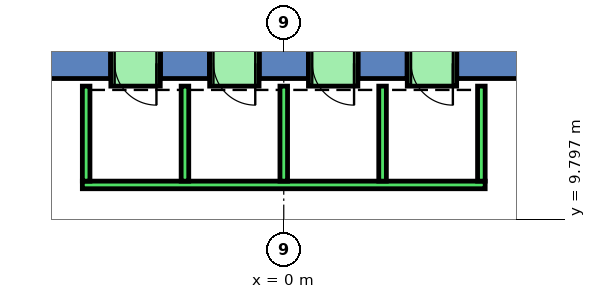
"""IFC4 building model, lengths in metres.
Left out: names, types, materials, properties, quantities, classifications, styles, units other than length and angle.
Written with IfcOpenShell. Run it as: python <this file> out.ifc"""

import sys

from ifc_helpers import new_model, si_unit, direction, frame, frame_2d, origin, place, context, subcontext, project, spatial, polyline, rectangle, outline, extrude, element, fill, save


model = new_model("IFC4")
c1 = context("Model", 3, precision=1e-05, world=origin(), true_north=direction((0.0, 1.0)))
c2 = subcontext(c1, "Body", "Model", "MODEL_VIEW")
j1 = project(units=[si_unit("LENGTHUNIT", "METRE"), si_unit("PLANEANGLEUNIT", "RADIAN")], contexts=[c1])
p1 = place(None, origin())
s1 = spatial("IfcSite", under=j1, at=p1, CompositionType="ELEMENT")
p2 = place(p1, origin())
s2 = spatial("IfcBuilding", under=s1, at=p2, CompositionType="ELEMENT")
p3 = place(p2, frame((0.0, 0.0, 30.0)))
s3 = spatial("IfcBuildingStorey", under=s2, at=p3, CompositionType="ELEMENT", Elevation=30.0)
p4 = place(p3, frame((0.0, 0.0, -0.45)))
e1 = element("IfcWall", 1, at=p4, inside=s3, PredefinedType="SHEAR", context=c2, shape_type="SweptSolid", body=[
    extrude(outline(polyline([(4.55, 14.5), (4.55, 13.5), (6.351, 13.5), (6.928, 14.5), (4.55, 14.5)])), origin(), (0.0, 0.0, 1.0), 4.85),
])
p5 = place(p3, frame((0.0, 0.0, -0.45)))
e2 = element("IfcWall", 2, at=p5, inside=s3, PredefinedType="SHEAR", context=c2, shape_type="SweptSolid", body=[
    extrude(outline(polyline([(1.95, 14.5), (1.95, 13.5), (3.25, 13.5), (3.25, 14.5), (1.95, 14.5)])), origin(), (0.0, 0.0, 1.0), 4.85),
])
p6 = place(p3, frame((0.0, 0.0, -0.45)))
e3 = element("IfcWall", 3, at=p6, inside=s3, PredefinedType="SHEAR", context=c2, shape_type="SweptSolid", body=[
    extrude(outline(polyline([(-0.65, 14.5), (-0.65, 13.5), (0.65, 13.5), (0.65, 14.5), (-0.65, 14.5)])), origin(), (0.0, 0.0, 1.0), 4.85),
])
p7 = place(p3, frame((0.0, 0.0, -0.45)))
e4 = element("IfcWall", 4, at=p7, inside=s3, PredefinedType="SHEAR", context=c2, shape_type="SweptSolid", body=[
    extrude(outline(polyline([(-3.25, 14.5), (-3.25, 13.5), (-1.95, 13.5), (-1.95, 14.5), (-3.25, 14.5)])), origin(), (0.0, 0.0, 1.0), 4.85),
])
p8 = place(p3, frame((0.0, 0.0, -0.45)))
e5 = element("IfcWall", 5, at=p8, inside=s3, PredefinedType="SHEAR", context=c2, shape_type="SweptSolid", body=[
    extrude(outline(polyline([(-4.55, 13.5), (-4.55, 14.5), (-6.928, 14.5), (-6.351, 13.5), (-4.55, 13.5)])), origin(), (0.0, 0.0, 1.0), 4.85),
])
p9 = place(p3, frame((0.0, 0.0, 3.6)))
e6 = element("IfcWall", 6, at=p9, inside=s3, PredefinedType="SHEAR", context=c2, shape_type="SweptSolid", body=[
    extrude(outline(polyline([(3.25, 14.5), (3.25, 13.5), (4.55, 13.5), (4.55, 14.5), (3.25, 14.5)])), origin(), (0.0, 0.0, 1.0), 0.8),
])
p10 = place(p3, frame((0.0, 0.0, 3.6)))
e7 = element("IfcWall", 7, at=p10, inside=s3, PredefinedType="SHEAR", context=c2, shape_type="SweptSolid", body=[
    extrude(outline(polyline([(0.65, 14.5), (0.65, 13.5), (1.95, 13.5), (1.95, 14.5), (0.65, 14.5)])), origin(), (0.0, 0.0, 1.0), 0.8),
])
p11 = place(p3, frame((0.0, 0.0, 3.6)))
e8 = element("IfcWall", 8, at=p11, inside=s3, PredefinedType="SHEAR", context=c2, shape_type="SweptSolid", body=[
    extrude(outline(polyline([(-1.95, 14.5), (-1.95, 13.5), (-0.65, 13.5), (-0.65, 14.5), (-1.95, 14.5)])), origin(), (0.0, 0.0, 1.0), 0.8),
])
p12 = place(p3, frame((0.0, 0.0, 3.6)))
e9 = element("IfcWall", 9, at=p12, inside=s3, PredefinedType="SHEAR", context=c2, shape_type="SweptSolid", body=[
    extrude(outline(polyline([(-4.55, 14.5), (-4.55, 13.5), (-3.25, 13.5), (-3.25, 14.5), (-4.55, 14.5)])), origin(), (0.0, 0.0, 1.0), 0.8),
])
p13 = place(p3, frame((5.3, 10.7, 0.0), z_axis=(0.0, 0.0, 1.0), x_axis=(-1.0, 0.0, 0.0)))
e10 = element("IfcWall", 10, at=p13, inside=s3, PredefinedType="STANDARD", context=c2, shape_type="SweptSolid", body=[
    extrude(rectangle(XDim=10.6, YDim=0.2, at=frame_2d((5.3, 0.0))), origin(), (0.0, 0.0, 1.0), 4.4),
])
for number, where, z_axis, x_axis in (
    (11, (5.2, 10.8, 0.0), (0.0, 0.0, 1.0), (0.0, 1.0, 0.0)),
    (12, (2.6, 10.8, 0.0), (0.0, 0.0, 1.0), (0.0, 1.0, 0.0)),
    (13, (0.0, 10.8, 0.0), (0.0, 0.0, 1.0), (0.0, 1.0, 0.0)),
    (14, (-2.6, 10.8, 0.0), (0.0, 0.0, 1.0), (0.0, 1.0, 0.0)),
    (15, (-5.2, 10.8, 0.0), (0.0, 0.0, 1.0), (0.0, 1.0, 0.0)),
):
    element("IfcWall", number, at=place(p3, frame(where, z_axis=z_axis, x_axis=x_axis)), inside=s3, PredefinedType="STANDARD", context=c2, shape_type="SweptSolid", body=[
        extrude(rectangle(XDim=2.5, YDim=0.2, at=frame_2d((1.25, 0.0))), origin(), (0.0, 0.0, 1.0), 4.4),
    ])
p14 = place(p3, frame((4.55, 13.9, 0.0), z_axis=(0.0, 0.0, 1.0), x_axis=(-1.0, 0.0, 0.0)))
e16 = element("IfcWall", 16, at=p14, inside=s3, PredefinedType="STANDARD", context=c2, shape_type="SweptSolid", body=[
    extrude(rectangle(XDim=1.3, YDim=1.2, at=frame_2d((0.65, 0.0))), origin(), (0.0, 0.0, 1.0), 2.4),
])
p15 = place(p14, frame((0.1, 0.0, 0.0)))
e17 = element("IfcOpeningElement", 17, at=p15, cuts=e16, PredefinedType="OPENING", context=c2, shape_type="SweptSolid", body=[
    extrude(rectangle(XDim=1.1, YDim=2.3, at=frame_2d((0.55, 1.15))), frame((0.0, 0.61, 0.0), z_axis=(0.0, -1.0, 0.0), x_axis=(1.0, 0.0, 0.0)), (0.0, 0.0, 1.0), 1.22),
])
p16 = place(p3, frame((1.95, 13.9, 0.0), z_axis=(0.0, 0.0, 1.0), x_axis=(-1.0, 0.0, 0.0)))
e18 = element("IfcWall", 18, at=p16, inside=s3, PredefinedType="STANDARD", context=c2, shape_type="SweptSolid", body=[
    extrude(rectangle(XDim=1.3, YDim=1.2, at=frame_2d((0.65, 0.0))), origin(), (0.0, 0.0, 1.0), 2.4),
])
p17 = place(p16, frame((0.1, 0.0, 0.0)))
e19 = element("IfcOpeningElement", 19, at=p17, cuts=e18, PredefinedType="OPENING", context=c2, shape_type="SweptSolid", body=[
    extrude(rectangle(XDim=1.1, YDim=2.3, at=frame_2d((0.55, 1.15))), frame((0.0, 0.61, 0.0), z_axis=(0.0, -1.0, 0.0), x_axis=(1.0, 0.0, 0.0)), (0.0, 0.0, 1.0), 1.22),
])
p18 = place(p3, frame((-0.65, 13.9, 0.0), z_axis=(0.0, 0.0, 1.0), x_axis=(-1.0, 0.0, 0.0)))
e20 = element("IfcWall", 20, at=p18, inside=s3, PredefinedType="STANDARD", context=c2, shape_type="SweptSolid", body=[
    extrude(rectangle(XDim=1.3, YDim=1.2, at=frame_2d((0.65, 0.0))), origin(), (0.0, 0.0, 1.0), 2.4),
])
p19 = place(p18, frame((0.1, 0.0, 0.0)))
e21 = element("IfcOpeningElement", 21, at=p19, cuts=e20, PredefinedType="OPENING", context=c2, shape_type="SweptSolid", body=[
    extrude(rectangle(XDim=1.1, YDim=2.3, at=frame_2d((0.55, 1.15))), frame((0.0, 0.61, 0.0), z_axis=(0.0, -1.0, 0.0), x_axis=(1.0, 0.0, 0.0)), (0.0, 0.0, 1.0), 1.22),
])
p20 = place(p3, frame((-3.25, 13.9, 0.0), z_axis=(0.0, 0.0, 1.0), x_axis=(-1.0, 0.0, 0.0)))
e22 = element("IfcWall", 22, at=p20, inside=s3, PredefinedType="STANDARD", context=c2, shape_type="SweptSolid", body=[
    extrude(rectangle(XDim=1.3, YDim=1.2, at=frame_2d((0.65, 0.0))), origin(), (0.0, 0.0, 1.0), 2.4),
])
p21 = place(p20, frame((0.1, 0.0, 0.0)))
e23 = element("IfcOpeningElement", 23, at=p21, cuts=e22, PredefinedType="OPENING", context=c2, shape_type="SweptSolid", body=[
    extrude(rectangle(XDim=1.1, YDim=2.3, at=frame_2d((0.55, 1.15))), frame((0.0, 0.61, 0.0), z_axis=(0.0, -1.0, 0.0), x_axis=(1.0, 0.0, 0.0)), (0.0, 0.0, 1.0), 1.22),
])
p22 = place(p15, origin())
e24 = element("IfcDoor", 24, at=p22, inside=s3, OperationType="SLIDING_TO_LEFT", PredefinedType="DOOR", context=c2, shape_type="SweptSolid", body=[
    extrude(rectangle(XDim=1.1, YDim=2.3, at=frame_2d((0.55, 1.15))), frame((0.0, 0.025, 0.0), z_axis=(0.0, -1.0, 0.0), x_axis=(1.0, 0.0, 0.0)), (0.0, 0.0, 1.0), 0.05),
])
fill(e17, e24)
p23 = place(p17, origin())
e25 = element("IfcDoor", 25, at=p23, inside=s3, OperationType="SLIDING_TO_LEFT", PredefinedType="DOOR", context=c2, shape_type="SweptSolid", body=[
    extrude(rectangle(XDim=1.1, YDim=2.3, at=frame_2d((0.55, 1.15))), frame((0.0, 0.025, 0.0), z_axis=(0.0, -1.0, 0.0), x_axis=(1.0, 0.0, 0.0)), (0.0, 0.0, 1.0), 0.05),
])
fill(e19, e25)
p24 = place(p19, origin())
e26 = element("IfcDoor", 26, at=p24, inside=s3, OperationType="SLIDING_TO_LEFT", PredefinedType="DOOR", context=c2, shape_type="SweptSolid", body=[
    extrude(rectangle(XDim=1.1, YDim=2.3, at=frame_2d((0.55, 1.15))), frame((0.0, 0.025, 0.0), z_axis=(0.0, -1.0, 0.0), x_axis=(1.0, 0.0, 0.0)), (0.0, 0.0, 1.0), 0.05),
])
fill(e21, e26)
p25 = place(p21, origin())
e27 = element("IfcDoor", 27, at=p25, inside=s3, OperationType="SLIDING_TO_LEFT", PredefinedType="DOOR", context=c2, shape_type="SweptSolid", body=[
    extrude(rectangle(XDim=1.1, YDim=2.3, at=frame_2d((0.55, 1.15))), frame((0.0, 0.025, 0.0), z_axis=(0.0, -1.0, 0.0), x_axis=(1.0, 0.0, 0.0)), (0.0, 0.0, 1.0), 0.05),
])
fill(e23, e27)
save(model, sys.argv[1])
